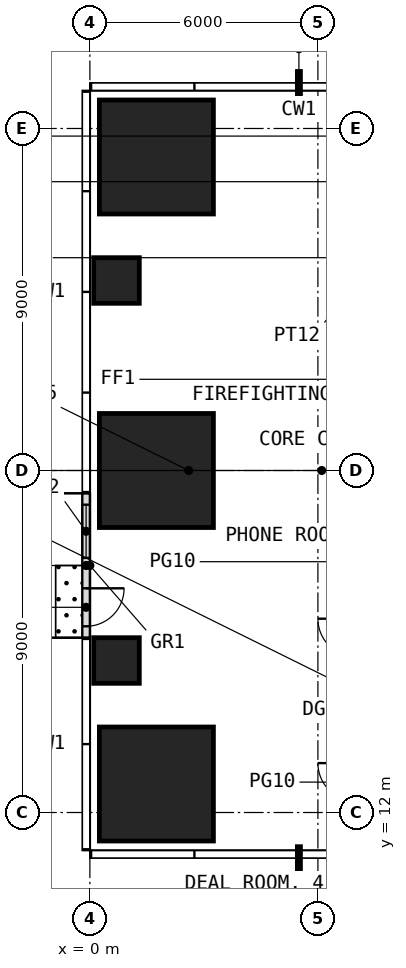
"""IFC4 building model, lengths in metres.
Left out: names, types, materials, properties, quantities, classifications, styles, units other than length and angle.
Written with IfcOpenShell. Run it as: python <this file> out.ifc"""

import sys

from ifc_helpers import new_model, si_unit, direction, frame, frame_2d, origin, origin_2d, place, context, subcontext, project, spatial, rectangle, extrude, element, fill, save


model = new_model("IFC4")
c1 = context("Model", 3, precision=1e-05, world=origin(), true_north=direction((0.0, 1.0)))
c2 = subcontext(c1, "Body", "Model", "MODEL_VIEW")
j1 = project(units=[si_unit("LENGTHUNIT", "METRE"), si_unit("PLANEANGLEUNIT", "RADIAN")], contexts=[c1])
p1 = place(None, origin())
s1 = spatial("IfcSite", under=j1, at=p1, CompositionType="ELEMENT")
p2 = place(p1, origin())
s2 = spatial("IfcBuilding", under=s1, at=p2, CompositionType="ELEMENT")
p3 = place(p2, frame((0.0, 0.0, 120.5)))
s3 = spatial("IfcBuildingStorey", under=s2, at=p3, CompositionType="ELEMENT", Elevation=120.5)
p4 = place(p3, frame((1.75, 12.75, 0.0), z_axis=(0.0, 0.0, 1.0), x_axis=(1.0, 0.0, 0.0)))
e1 = element("IfcColumn", 1, at=p4, inside=s3, PredefinedType="COLUMN", context=c2, shape_type="SweptSolid", body=[
    extrude(rectangle(XDim=3.0, YDim=3.0, at=origin_2d()), origin(), (0.0, 0.0, 1.0), 4.0),
])
p5 = place(p3, frame((0.7, 16.0, 0.0), z_axis=(0.0, 0.0, 1.0), x_axis=(1.0, 0.0, 0.0)))
e2 = element("IfcColumn", 2, at=p5, inside=s3, PredefinedType="COLUMN", context=c2, shape_type="SweptSolid", body=[
    extrude(rectangle(XDim=1.2, YDim=1.2, at=origin_2d()), origin(), (0.0, 0.0, 1.0), 4.0),
])
p6 = place(p3, frame((1.75, 21.0, 0.0), z_axis=(0.0, 0.0, 1.0), x_axis=(1.0, 0.0, 0.0)))
e3 = element("IfcColumn", 3, at=p6, inside=s3, PredefinedType="COLUMN", context=c2, shape_type="SweptSolid", body=[
    extrude(rectangle(XDim=3.0, YDim=3.0, at=origin_2d()), origin(), (0.0, 0.0, 1.0), 4.0),
])
p7 = place(p3, frame((0.7, 26.0, 0.0), z_axis=(0.0, 0.0, 1.0), x_axis=(1.0, 0.0, 0.0)))
e4 = element("IfcColumn", 4, at=p7, inside=s3, PredefinedType="COLUMN", context=c2, shape_type="SweptSolid", body=[
    extrude(rectangle(XDim=1.2, YDim=1.2, at=origin_2d()), origin(), (0.0, 0.0, 1.0), 4.0),
])
p8 = place(p3, frame((1.75, 29.25, 0.0), z_axis=(0.0, 0.0, 1.0), x_axis=(1.0, 0.0, 0.0)))
e5 = element("IfcColumn", 5, at=p8, inside=s3, PredefinedType="COLUMN", context=c2, shape_type="SweptSolid", body=[
    extrude(rectangle(XDim=3.0, YDim=3.0, at=origin_2d()), origin(), (0.0, 0.0, 1.0), 4.0),
])
p9 = place(p3, frame((-0.1, 20.4, 0.0), z_axis=(0.0, 0.0, 1.0), x_axis=(0.0, -1.0, 0.0)))
e6 = element("IfcWall", 6, at=p9, inside=s3, PredefinedType="USERDEFINED", context=c2, shape_type="SweptSolid", body=[
    extrude(rectangle(XDim=3.8, YDim=0.2, at=frame_2d((1.9, 0.0))), origin(), (0.0, 0.0, 1.0), 3.75),
])
p10 = place(p9, frame((2.5, 0.0, 0.0)))
e7 = element("IfcOpeningElement", 7, at=p10, cuts=e6, PredefinedType="OPENING", context=c2, shape_type="SweptSolid", body=[
    extrude(rectangle(XDim=1.0, YDim=2.4, at=frame_2d((0.5, 1.2))), frame((0.0, 0.11, 0.0), z_axis=(0.0, -1.0, 0.0), x_axis=(1.0, 0.0, 0.0)), (0.0, 0.0, 1.0), 0.22),
])
p11 = place(p9, frame((0.3, 0.0, 0.3)))
e8 = element("IfcOpeningElement", 8, at=p11, cuts=e6, PredefinedType="OPENING", context=c2, shape_type="SweptSolid", body=[
    extrude(rectangle(XDim=1.4, YDim=2.7, at=frame_2d((0.7, 1.35))), frame((0.0, 0.11, 0.0), z_axis=(0.0, -1.0, 0.0), x_axis=(1.0, 0.0, 0.0)), (0.0, 0.0, 1.0), 0.22),
])
p12 = place(p10, origin())
e9 = element("IfcDoor", 9, at=p12, inside=s3, OperationType="SINGLE_SWING_LEFT", PredefinedType="DOOR", context=c2, shape_type="SweptSolid", body=[
    extrude(rectangle(XDim=1.0, YDim=2.4, at=frame_2d((0.5, 1.2))), frame((0.0, 0.025, 0.0), z_axis=(0.0, -1.0, 0.0), x_axis=(1.0, 0.0, 0.0)), (0.0, 0.0, 1.0), 0.05),
])
fill(e7, e9)
p13 = place(p11, origin())
e10 = element("IfcWindow", 10, at=p13, inside=s3, PartitioningType="SINGLE_PANEL", PredefinedType="WINDOW", context=c2, shape_type="SweptSolid", body=[
    extrude(rectangle(XDim=1.4, YDim=2.7, at=frame_2d((0.7, 1.35))), frame((0.0, 0.03, 0.0), z_axis=(0.0, -1.0, 0.0), x_axis=(1.0, 0.0, 0.0)), (0.0, 0.0, 1.0), 0.06),
])
fill(e8, e10)
save(model, sys.argv[1])
